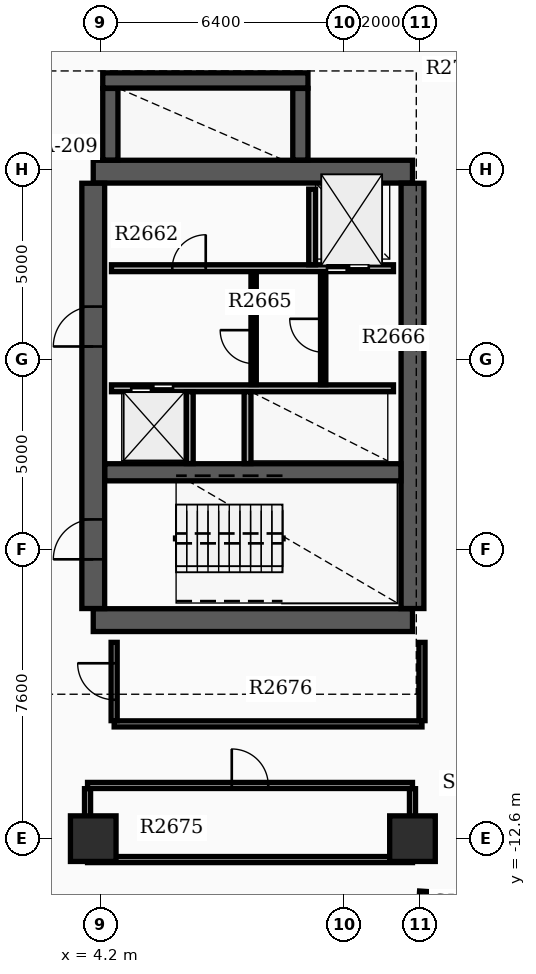
"""IFC4 building model, lengths in metres.
Left out: names, types, materials, properties, quantities, classifications, styles, units other than length and angle.
Written with IfcOpenShell. Run it as: python <this file> out.ifc"""

import sys

from ifc_helpers import new_model, si_unit, direction, frame, frame_2d, origin, origin_2d, place, context, subcontext, project, spatial, rectangle, extrude, element, fill, save


model = new_model("IFC4")
c1 = context("Model", 3, precision=1e-05, world=origin(), true_north=direction((0.0, 1.0)))
c2 = subcontext(c1, "Body", "Model", "MODEL_VIEW")
j1 = project(units=[si_unit("LENGTHUNIT", "METRE"), si_unit("PLANEANGLEUNIT", "RADIAN")], contexts=[c1])
p1 = place(None, origin())
s1 = spatial("IfcSite", under=j1, at=p1, CompositionType="ELEMENT")
p2 = place(p1, origin())
s2 = spatial("IfcBuilding", under=s1, at=p2, CompositionType="ELEMENT")
p3 = place(p2, frame((0.0, 0.0, 168.3)))
s3 = spatial("IfcBuildingStorey", under=s2, at=p3, CompositionType="ELEMENT", Elevation=168.3)
for number, where, z_axis, x_axis in (
    (1, (4.0, -6.85, 0.0), (0.0, 0.0, 1.0), (1.0, 0.0, 0.0)),
    (2, (4.0, 4.95, 0.0), (0.0, 0.0, 1.0), (1.0, 0.0, 0.0)),
):
    element("IfcWall", number, at=place(p3, frame(where, z_axis=z_axis, x_axis=x_axis)), inside=s3, PredefinedType="SHEAR", context=c2, shape_type="SweptSolid", body=[
        extrude(rectangle(XDim=8.4, YDim=0.6, at=frame_2d((4.2, 0.0))), origin(), (0.0, 0.0, 1.0), 3.7),
    ])
p4 = place(p3, frame((4.0, -6.545, 0.0), z_axis=(0.0, 0.0, 1.0), x_axis=(0.0, 1.0, 0.0)))
e3 = element("IfcWall", 3, at=p4, inside=s3, PredefinedType="SHEAR", context=c2, shape_type="SweptSolid", body=[
    extrude(rectangle(XDim=11.19, YDim=0.6, at=frame_2d((5.595, 0.0))), origin(), (0.0, 0.0, 1.0), 3.7),
])
p5 = place(p4, frame((1.295, 0.0, 0.0)))
e4 = element("IfcOpeningElement", 4, at=p5, cuts=e3, PredefinedType="OPENING", context=c2, shape_type="SweptSolid", body=[
    extrude(rectangle(XDim=1.05, YDim=2.15, at=frame_2d((0.525, 1.075))), frame((0.0, 0.31, 0.0), z_axis=(0.0, -1.0, 0.0), x_axis=(1.0, 0.0, 0.0)), (0.0, 0.0, 1.0), 0.62),
])
p6 = place(p4, frame((6.895, 0.0, 0.0)))
e5 = element("IfcOpeningElement", 5, at=p6, cuts=e3, PredefinedType="OPENING", context=c2, shape_type="SweptSolid", body=[
    extrude(rectangle(XDim=1.05, YDim=2.15, at=frame_2d((0.525, 1.075))), frame((0.0, 0.31, 0.0), z_axis=(0.0, -1.0, 0.0), x_axis=(1.0, 0.0, 0.0)), (0.0, 0.0, 1.0), 0.62),
])
p7 = place(p3, frame((12.4, -6.545, 0.0), z_axis=(0.0, 0.0, 1.0), x_axis=(0.0, 1.0, 0.0)))
e6 = element("IfcWall", 6, at=p7, inside=s3, PredefinedType="SHEAR", context=c2, shape_type="SweptSolid", body=[
    extrude(rectangle(XDim=11.19, YDim=0.6, at=frame_2d((5.595, 0.0))), origin(), (0.0, 0.0, 1.0), 3.7),
])
p8 = place(p3, frame((4.305, -2.96, 0.0), z_axis=(0.0, 0.0, 1.0), x_axis=(1.0, 0.0, 0.0)))
e7 = element("IfcWall", 7, at=p8, inside=s3, PredefinedType="SHEAR", context=c2, shape_type="SweptSolid", body=[
    extrude(rectangle(XDim=7.79, YDim=0.45, at=frame_2d((3.895, 0.0))), origin(), (0.0, 0.0, 1.0), 3.7),
])
p9 = place(p3, frame((4.45, 5.255, 0.0), z_axis=(0.0, 0.0, 1.0), x_axis=(0.0, 1.0, 0.0)))
e8 = element("IfcWall", 8, at=p9, inside=s3, PredefinedType="SHEAR", context=c2, shape_type="SweptSolid", body=[
    extrude(rectangle(XDim=1.885, YDim=0.4, at=frame_2d((0.942, 0.0))), origin(), (0.0, 0.0, 1.0), 3.7),
])
p10 = place(p3, frame((4.25, 7.35, 0.0), z_axis=(0.0, 0.0, 1.0), x_axis=(1.0, 0.0, 0.0)))
e9 = element("IfcWall", 9, at=p10, inside=s3, PredefinedType="SHEAR", context=c2, shape_type="SweptSolid", body=[
    extrude(rectangle(XDim=5.4, YDim=0.4, at=frame_2d((2.7, 0.0))), origin(), (0.0, 0.0, 1.0), 3.7),
])
p11 = place(p3, frame((9.45, 5.255, 0.0), z_axis=(0.0, 0.0, 1.0), x_axis=(0.0, 1.0, 0.0)))
e10 = element("IfcWall", 10, at=p11, inside=s3, PredefinedType="SHEAR", context=c2, shape_type="SweptSolid", body=[
    extrude(rectangle(XDim=1.885, YDim=0.4, at=frame_2d((0.942, 0.0))), origin(), (0.0, 0.0, 1.0), 3.7),
])
for number, where, z_axis, x_axis in (
    (11, (12.4, -12.6, 0.0), (0.0, 0.0, 1.0), (1.0, 0.0, 0.0)),
    (12, (4.0, -12.6, 0.0), (0.0, 0.0, 1.0), (1.0, 0.0, 0.0)),
):
    element("IfcColumn", number, at=place(p3, frame(where, z_axis=z_axis, x_axis=x_axis)), inside=s3, PredefinedType="COLUMN", context=c2, shape_type="SweptSolid", body=[
        extrude(rectangle(XDim=1.2, YDim=1.2, at=origin_2d()), origin(), (0.0, 0.0, 1.0), 3.9),
    ])
p12 = place(p3, frame((13.796, -14.194, 0.0), z_axis=(0.0, 0.0, 1.0), x_axis=(-0.998023660242, 0.06283926796, 0.0)))
e13 = element("IfcWall", 13, at=p12, inside=s3, PredefinedType="STANDARD", context=c2, shape_type="SweptSolid", body=[
    extrude(rectangle(XDim=1.22, YDim=0.28, at=frame_2d((0.61, 0.0))), origin(), (0.0, 0.0, 1.0), 2.97),
])
p13 = place(p3, frame((4.48, 2.41, 0.0), z_axis=(0.0, 0.0, 1.0), x_axis=(1.0, 0.0, 0.0)))
e14 = element("IfcWall", 14, at=p13, inside=s3, PredefinedType="SOLIDWALL", context=c2, shape_type="SweptSolid", body=[
    extrude(rectangle(XDim=7.42, YDim=0.18, at=frame_2d((3.71, 0.0))), origin(), (0.0, 0.0, 1.0), 2.96),
])
p14 = place(p13, frame((5.67, 0.0, 0.0)))
e15 = element("IfcOpeningElement", 15, at=p14, cuts=e14, PredefinedType="OPENING", context=c2, shape_type="SweptSolid", body=[
    extrude(rectangle(XDim=1.1, YDim=2.15, at=frame_2d((0.55, 1.075))), frame((0.0, 0.1, 0.0), z_axis=(0.0, -1.0, 0.0), x_axis=(1.0, 0.0, 0.0)), (0.0, 0.0, 1.0), 0.2),
])
p15 = place(p13, frame((1.6, 0.0, 0.0)))
e16 = element("IfcOpeningElement", 16, at=p15, cuts=e14, PredefinedType="OPENING", context=c2, shape_type="SweptSolid", body=[
    extrude(rectangle(XDim=0.88, YDim=2.1, at=frame_2d((0.44, 1.05))), frame((0.0, 0.1, 0.0), z_axis=(0.0, -1.0, 0.0), x_axis=(1.0, 0.0, 0.0)), (0.0, 0.0, 1.0), 0.2),
])
p16 = place(p3, frame((4.48, -0.75, 0.0), z_axis=(0.0, 0.0, 1.0), x_axis=(1.0, 0.0, 0.0)))
e17 = element("IfcWall", 17, at=p16, inside=s3, PredefinedType="SOLIDWALL", context=c2, shape_type="SweptSolid", body=[
    extrude(rectangle(XDim=7.42, YDim=0.18, at=frame_2d((3.71, 0.0))), origin(), (0.0, 0.0, 1.0), 2.96),
])
p17 = place(p16, frame((0.52, 0.0, 0.0)))
e18 = element("IfcOpeningElement", 18, at=p17, cuts=e17, PredefinedType="OPENING", context=c2, shape_type="SweptSolid", body=[
    extrude(rectangle(XDim=1.1, YDim=2.15, at=frame_2d((0.55, 1.075))), frame((0.0, 0.1, 0.0), z_axis=(0.0, -1.0, 0.0), x_axis=(1.0, 0.0, 0.0)), (0.0, 0.0, 1.0), 0.2),
])
p18 = place(p3, frame((9.76, 2.5, 0.0), z_axis=(0.0, 0.0, 1.0), x_axis=(0.0, 1.0, 0.0)))
e19 = element("IfcWall", 19, at=p18, inside=s3, PredefinedType="SOLIDWALL", context=c2, shape_type="SweptSolid", body=[
    extrude(rectangle(XDim=1.99, YDim=0.18, at=frame_2d((0.995, 0.0))), origin(), (0.0, 0.0, 1.0), 2.96),
])
for number, where, z_axis, x_axis in (
    (20, (6.54, -2.73, 0.0), (0.0, 0.0, 1.0), (0.0, 1.0, 0.0)),
    (21, (8.06, -2.73, 0.0), (0.0, 0.0, 1.0), (0.0, 1.0, 0.0)),
):
    element("IfcWall", number, at=place(p3, frame(where, z_axis=z_axis, x_axis=x_axis)), inside=s3, PredefinedType="SOLIDWALL", context=c2, shape_type="SweptSolid", body=[
        extrude(rectangle(XDim=1.89, YDim=0.18, at=frame_2d((0.945, 0.0))), origin(), (0.0, 0.0, 1.0), 2.96),
    ])
p19 = place(p3, frame((8.22, -0.65, 0.0), z_axis=(0.0, 0.0, 1.0), x_axis=(0.0, 1.0, 0.0)))
e22 = element("IfcWall", 22, at=p19, inside=s3, PredefinedType="SOLIDWALL", context=c2, shape_type="SweptSolid", body=[
    extrude(rectangle(XDim=2.96, YDim=0.14, at=frame_2d((1.48, 0.0))), origin(), (0.0, 0.0, 1.0), 2.96),
])
p20 = place(p19, frame((0.55, 0.0, 0.0)))
e23 = element("IfcOpeningElement", 23, at=p20, cuts=e22, PredefinedType="OPENING", context=c2, shape_type="SweptSolid", body=[
    extrude(rectangle(XDim=0.88, YDim=2.1, at=frame_2d((0.44, 1.05))), frame((0.0, 0.08, 0.0), z_axis=(0.0, -1.0, 0.0), x_axis=(1.0, 0.0, 0.0)), (0.0, 0.0, 1.0), 0.16),
])
p21 = place(p3, frame((10.05, -0.652, 0.0), z_axis=(0.0, 0.0, 1.0), x_axis=(0.0, 1.0, 0.0)))
e24 = element("IfcWall", 24, at=p21, inside=s3, PredefinedType="PARTITIONING", context=c2, shape_type="SweptSolid", body=[
    extrude(rectangle(XDim=2.962, YDim=0.14, at=frame_2d((1.481, 0.0))), origin(), (0.0, 0.0, 1.0), 2.96),
])
p22 = place(p21, frame((0.85, 0.0, 0.0)))
e25 = element("IfcOpeningElement", 25, at=p22, cuts=e24, PredefinedType="OPENING", context=c2, shape_type="SweptSolid", body=[
    extrude(rectangle(XDim=0.88, YDim=2.1, at=frame_2d((0.44, 1.05))), frame((0.0, 0.08, 0.0), z_axis=(0.0, -1.0, 0.0), x_axis=(1.0, 0.0, 0.0)), (0.0, 0.0, 1.0), 0.16),
])
p23 = place(p3, frame((3.85, -13.15, 0.0), z_axis=(0.0, 0.0, 1.0), x_axis=(1.0, 0.0, 0.0)))
e26 = element("IfcWall", 26, at=p23, inside=s3, PredefinedType="PARTITIONING", context=c2, shape_type="SweptSolid", body=[
    extrude(rectangle(XDim=8.55, YDim=0.16, at=frame_2d((4.275, 0.0))), origin(), (0.0, 0.0, 1.0), 2.96),
])
p24 = place(p3, frame((3.85, -11.2, 0.0), z_axis=(0.0, 0.0, 1.0), x_axis=(1.0, 0.0, 0.0)))
e27 = element("IfcWall", 27, at=p24, inside=s3, PredefinedType="PARTITIONING", context=c2, shape_type="SweptSolid", body=[
    extrude(rectangle(XDim=8.55, YDim=0.16, at=frame_2d((4.275, 0.0))), origin(), (0.0, 0.0, 1.0), 2.96),
])
p25 = place(p24, frame((3.795, 0.0, 0.0)))
e28 = element("IfcOpeningElement", 28, at=p25, cuts=e27, PredefinedType="OPENING", context=c2, shape_type="SweptSolid", body=[
    extrude(rectangle(XDim=0.96, YDim=2.15, at=frame_2d((0.48, 1.075))), frame((0.0, 0.09, 0.0), z_axis=(0.0, -1.0, 0.0), x_axis=(1.0, 0.0, 0.0)), (0.0, 0.0, 1.0), 0.18),
])
for number, where, z_axis, x_axis in (
    (29, (3.85, -13.065, 0.0), (0.0, 0.0, 1.0), (0.0, 1.0, 0.0)),
    (30, (12.4, -13.065, 0.0), (0.0, 0.0, 1.0), (0.0, 1.0, 0.0)),
):
    element("IfcWall", number, at=place(p3, frame(where, z_axis=z_axis, x_axis=x_axis)), inside=s3, PredefinedType="PARTITIONING", context=c2, shape_type="SweptSolid", body=[
        extrude(rectangle(XDim=1.78, YDim=0.16, at=frame_2d((0.89, 0.0))), origin(), (0.0, 0.0, 1.0), 2.96),
    ])
p26 = place(p3, frame((4.55, -9.58, 0.0), z_axis=(0.0, 0.0, 1.0), x_axis=(1.0, 0.0, 0.0)))
e31 = element("IfcWall", 31, at=p26, inside=s3, PredefinedType="PARTITIONING", context=c2, shape_type="SweptSolid", body=[
    extrude(rectangle(XDim=8.1, YDim=0.16, at=frame_2d((4.05, 0.0))), origin(), (0.0, 0.0, 1.0), 2.96),
])
p27 = place(p3, frame((4.55, -9.495, 0.0), z_axis=(0.0, 0.0, 1.0), x_axis=(0.0, 1.0, 0.0)))
e32 = element("IfcWall", 32, at=p27, inside=s3, PredefinedType="PARTITIONING", context=c2, shape_type="SweptSolid", body=[
    extrude(rectangle(XDim=2.06, YDim=0.16, at=frame_2d((1.03, 0.0))), origin(), (0.0, 0.0, 1.0), 2.96),
])
p28 = place(p27, frame((0.55, 0.0, 0.0)))
e33 = element("IfcOpeningElement", 33, at=p28, cuts=e32, PredefinedType="OPENING", context=c2, shape_type="SweptSolid", body=[
    extrude(rectangle(XDim=0.96, YDim=2.15, at=frame_2d((0.48, 1.075))), frame((0.0, 0.09, 0.0), z_axis=(0.0, -1.0, 0.0), x_axis=(1.0, 0.0, 0.0)), (0.0, 0.0, 1.0), 0.18),
])
p29 = place(p3, frame((12.65, -9.495, 0.0), z_axis=(0.0, 0.0, 1.0), x_axis=(0.0, 1.0, 0.0)))
e34 = element("IfcWall", 34, at=p29, inside=s3, PredefinedType="PARTITIONING", context=c2, shape_type="SweptSolid", body=[
    extrude(rectangle(XDim=2.06, YDim=0.16, at=frame_2d((1.03, 0.0))), origin(), (0.0, 0.0, 1.0), 2.96),
])
p30 = place(p5, origin())
e35 = element("IfcDoor", 35, at=p30, inside=s3, OperationType="SINGLE_SWING_LEFT", PredefinedType="DOOR", context=c2, shape_type="SweptSolid", body=[
    extrude(rectangle(XDim=1.05, YDim=2.15, at=frame_2d((0.525, 1.075))), frame((0.0, 0.025, 0.0), z_axis=(0.0, -1.0, 0.0), x_axis=(1.0, 0.0, 0.0)), (0.0, 0.0, 1.0), 0.05),
])
fill(e4, e35)
p31 = place(p6, origin())
e36 = element("IfcDoor", 36, at=p31, inside=s3, OperationType="SINGLE_SWING_LEFT", PredefinedType="DOOR", context=c2, shape_type="SweptSolid", body=[
    extrude(rectangle(XDim=1.05, YDim=2.15, at=frame_2d((0.525, 1.075))), frame((0.0, 0.025, 0.0), z_axis=(0.0, -1.0, 0.0), x_axis=(1.0, 0.0, 0.0)), (0.0, 0.0, 1.0), 0.05),
])
fill(e5, e36)
p32 = place(p14, origin())
e37 = element("IfcDoor", 37, at=p32, inside=s3, OperationType="DOUBLE_DOOR_SLIDING", PredefinedType="DOOR", context=c2, shape_type="SweptSolid", body=[
    extrude(rectangle(XDim=1.1, YDim=2.15, at=frame_2d((0.55, 1.075))), frame((0.0, 0.025, 0.0), z_axis=(0.0, -1.0, 0.0), x_axis=(1.0, 0.0, 0.0)), (0.0, 0.0, 1.0), 0.05),
])
fill(e15, e37)
p33 = place(p17, origin())
e38 = element("IfcDoor", 38, at=p33, inside=s3, OperationType="DOUBLE_DOOR_SLIDING", PredefinedType="DOOR", context=c2, shape_type="SweptSolid", body=[
    extrude(rectangle(XDim=1.1, YDim=2.15, at=frame_2d((0.55, 1.075))), frame((0.0, 0.025, 0.0), z_axis=(0.0, -1.0, 0.0), x_axis=(1.0, 0.0, 0.0)), (0.0, 0.0, 1.0), 0.05),
])
fill(e18, e38)
p34 = place(p15, origin())
e39 = element("IfcDoor", 39, at=p34, inside=s3, OperationType="SINGLE_SWING_RIGHT", PredefinedType="DOOR", context=c2, shape_type="SweptSolid", body=[
    extrude(rectangle(XDim=0.88, YDim=2.1, at=frame_2d((0.44, 1.05))), frame((0.0, 0.025, 0.0), z_axis=(0.0, -1.0, 0.0), x_axis=(1.0, 0.0, 0.0)), (0.0, 0.0, 1.0), 0.05),
])
fill(e16, e39)
p35 = place(p20, origin())
e40 = element("IfcDoor", 40, at=p35, inside=s3, OperationType="SINGLE_SWING_RIGHT", PredefinedType="DOOR", context=c2, shape_type="SweptSolid", body=[
    extrude(rectangle(XDim=0.88, YDim=2.1, at=frame_2d((0.44, 1.05))), frame((0.0, 0.025, 0.0), z_axis=(0.0, -1.0, 0.0), x_axis=(1.0, 0.0, 0.0)), (0.0, 0.0, 1.0), 0.05),
])
fill(e23, e40)
p36 = place(p22, origin())
e41 = element("IfcDoor", 41, at=p36, inside=s3, OperationType="SINGLE_SWING_RIGHT", PredefinedType="DOOR", context=c2, shape_type="SweptSolid", body=[
    extrude(rectangle(XDim=0.88, YDim=2.1, at=frame_2d((0.44, 1.05))), frame((0.0, 0.025, 0.0), z_axis=(0.0, -1.0, 0.0), x_axis=(1.0, 0.0, 0.0)), (0.0, 0.0, 1.0), 0.05),
])
fill(e25, e41)
p37 = place(p25, origin())
e42 = element("IfcDoor", 42, at=p37, inside=s3, OperationType="SINGLE_SWING_LEFT", PredefinedType="DOOR", context=c2, shape_type="SweptSolid", body=[
    extrude(rectangle(XDim=0.96, YDim=2.15, at=frame_2d((0.48, 1.075))), frame((0.0, 0.025, 0.0), z_axis=(0.0, -1.0, 0.0), x_axis=(1.0, 0.0, 0.0)), (0.0, 0.0, 1.0), 0.05),
])
fill(e28, e42)
p38 = place(p28, origin())
e43 = element("IfcDoor", 43, at=p38, inside=s3, OperationType="SINGLE_SWING_RIGHT", PredefinedType="DOOR", context=c2, shape_type="SweptSolid", body=[
    extrude(rectangle(XDim=0.96, YDim=2.15, at=frame_2d((0.48, 1.075))), frame((0.0, 0.025, 0.0), z_axis=(0.0, -1.0, 0.0), x_axis=(1.0, 0.0, 0.0)), (0.0, 0.0, 1.0), 0.05),
])
fill(e33, e43)
save(model, sys.argv[1])
